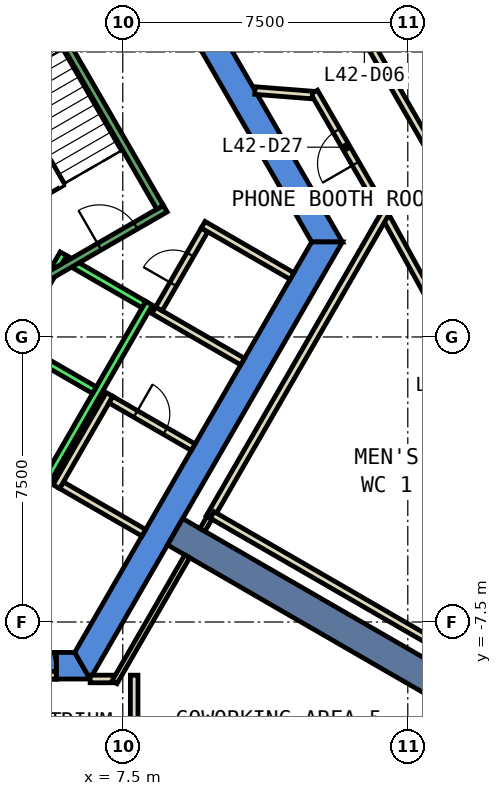
"""IFC4 building model, lengths in metres.
Left out: names, types, materials, properties, quantities, classifications, styles, units other than length and angle.
Written with IfcOpenShell. Run it as: python <this file> out.ifc"""

import sys

from ifc_helpers import new_model, si_unit, direction, frame, frame_2d, origin, place, context, subcontext, project, spatial, polyline, rectangle, outline, extrude, element, fill, save


model = new_model("IFC4")
c1 = context("Model", 3, precision=1e-05, world=origin(), true_north=direction((0.0, 1.0)))
c2 = subcontext(c1, "Body", "Model", "MODEL_VIEW")
j1 = project(units=[si_unit("LENGTHUNIT", "METRE"), si_unit("PLANEANGLEUNIT", "RADIAN")], contexts=[c1])
p1 = place(None, origin())
s1 = spatial("IfcSite", under=j1, at=p1, CompositionType="ELEMENT")
p2 = place(p1, origin())
s2 = spatial("IfcBuilding", under=s1, at=p2, CompositionType="ELEMENT")
p3 = place(p2, frame((0.0, 0.0, 189.8)))
s3 = spatial("IfcBuildingStorey", under=s2, at=p3, CompositionType="ELEMENT", Elevation=189.8)
p4 = place(p3, frame((0.0, 0.0, -0.6)))
e1 = element("IfcWall", 1, at=p4, inside=s3, PredefinedType="SHEAR", context=c2, shape_type="SweptSolid", body=[
    extrude(outline(polyline([(8.084, 11.498), (7.478, 11.148), (12.471, 2.5), (13.279, 2.5), (8.084, 11.498)])), origin(), (0.0, 0.0, 1.0), 4.4),
])
p5 = place(p3, frame((0.0, 0.0, -0.6)))
e2 = element("IfcWall", 2, at=p5, inside=s3, PredefinedType="SHEAR", context=c2, shape_type="SweptSolid", body=[
    extrude(outline(polyline([(5.75, -8.3), (5.75, -9.0), (6.64, -9.0), (6.235, -8.3), (5.75, -8.3)])), origin(), (0.0, 0.0, 1.0), 4.4),
])
p6 = place(p3, frame((0.0, 0.0, 3.6)))
e3 = element("IfcWall", 3, at=p6, inside=s3, PredefinedType="SHEAR", context=c2, shape_type="SweptSolid", body=[
    extrude(outline(polyline([(5.75, -9.0), (5.75, -8.3), (3.75, -8.3), (3.75, -9.0), (5.75, -9.0)])), origin(), (0.0, 0.0, 1.0), 0.2),
])
p7 = place(p3, frame((0.0, 0.0, -0.6)))
e4 = element("IfcWall", 4, at=p7, inside=s3, PredefinedType="SHEAR", context=c2, shape_type="SweptSolid", body=[
    extrude(outline(polyline([(6.64, -9.0), (13.279, 2.5), (12.471, 2.5), (6.235, -8.3), (6.64, -9.0)])), origin(), (0.0, 0.0, 1.0), 4.4),
])
p8 = place(p3, frame((8.877, -5.125, -0.6), z_axis=(0.0, 0.0, 1.0), x_axis=(0.866017533419, -0.500013631625, 0.0)))
e5 = element("IfcWall", 5, at=p8, inside=s3, PredefinedType="SHEAR", context=c2, shape_type="SweptSolid", body=[
    extrude(rectangle(XDim=9.0, YDim=0.8, at=frame_2d((4.5, 0.0))), origin(), (0.0, 0.0, 1.0), 4.4),
])
p9 = place(p3, frame((14.213, 3.543, 0.0), z_axis=(0.0, 0.0, 1.0), x_axis=(-0.500182898346, 0.865919781621, 0.0)))
e6 = element("IfcWall", 6, at=p9, inside=s3, PredefinedType="PARTITIONING", context=c2, shape_type="SweptSolid", body=[
    extrude(rectangle(XDim=3.35, YDim=0.2, at=frame_2d((1.675, 0.0))), origin(), (0.0, 0.0, 1.0), 3.8),
])
p10 = place(p9, frame((1.175, 0.0, 0.0)))
e7 = element("IfcOpeningElement", 7, at=p10, cuts=e6, PredefinedType="OPENING", context=c2, shape_type="SweptSolid", body=[
    extrude(rectangle(XDim=1.0, YDim=2.1, at=frame_2d((0.5, 1.05))), frame((0.0, 0.11, 0.0), z_axis=(0.0, -1.0, 0.0), x_axis=(1.0, 0.0, 0.0)), (0.0, 0.0, 1.0), 0.22),
])
p11 = place(p3, frame((12.488, 6.366, 0.0), z_axis=(0.0, 0.0, 1.0), x_axis=(-0.996960771308, 0.077905201835, 0.0)))
e8 = element("IfcWall", 8, at=p11, inside=s3, PredefinedType="PARTITIONING", context=c2, shape_type="SweptSolid", body=[
    extrude(rectangle(XDim=1.514, YDim=0.2, at=frame_2d((0.757, 0.0))), origin(), (0.0, 0.0, 1.0), 3.8),
])
p12 = place(p3, frame((18.112, -3.531, 0.0), z_axis=(0.0, 0.0, 1.0), x_axis=(-0.482800061144, 0.875730609811, 0.0)))
e9 = element("IfcWall", 9, at=p12, inside=s3, PredefinedType="PARTITIONING", context=c2, shape_type="SweptSolid", body=[
    extrude(rectangle(XDim=7.612, YDim=0.2, at=frame_2d((3.806, 0.0))), origin(), (0.0, 0.0, 1.0), 3.8),
])
p13 = place(p12, frame((3.306, 0.0, 0.0)))
e10 = element("IfcOpeningElement", 10, at=p13, cuts=e9, PredefinedType="OPENING", context=c2, shape_type="SweptSolid", body=[
    extrude(rectangle(XDim=1.0, YDim=2.1, at=frame_2d((0.5, 1.05))), frame((0.0, 0.11, 0.0), z_axis=(0.0, -1.0, 0.0), x_axis=(1.0, 0.0, 0.0)), (0.0, 0.0, 1.0), 0.22),
])
p14 = place(p3, frame((11.811, 11.503, 0.0), z_axis=(0.0, 0.0, 1.0), x_axis=(0.500013420409, -0.866017655369, 0.0)))
e11 = element("IfcWall", 11, at=p14, inside=s3, PredefinedType="PARTITIONING", context=c2, shape_type="SweptSolid", body=[
    extrude(rectangle(XDim=8.038, YDim=0.2, at=frame_2d((4.019, 0.0))), origin(), (0.0, 0.0, 1.0), 3.8),
])
p15 = place(p14, frame((3.594, 0.0, 0.0)))
e12 = element("IfcOpeningElement", 12, at=p15, cuts=e11, PredefinedType="OPENING", context=c2, shape_type="SweptSolid", body=[
    extrude(rectangle(XDim=1.0, YDim=2.1, at=frame_2d((0.5, 1.05))), frame((0.0, 0.11, 0.0), z_axis=(0.0, -1.0, 0.0), x_axis=(1.0, 0.0, 0.0)), (0.0, 0.0, 1.0), 0.22),
])
p16 = place(p3, frame((8.053, -5.152, 0.0), z_axis=(0.0, 0.0, 1.0), x_axis=(-0.866022959057, 0.500004234368, 0.0)))
e13 = element("IfcWall", 13, at=p16, inside=s3, PredefinedType="PARTITIONING", context=c2, shape_type="SweptSolid", body=[
    extrude(rectangle(XDim=2.5, YDim=0.2, at=frame_2d((1.25, 0.0))), origin(), (0.0, 0.0, 1.0), 3.8),
])
p17 = place(p3, frame((5.751, -3.938, 0.0), z_axis=(0.0, 0.0, 1.0), x_axis=(0.49994636267, 0.866056369097, 0.0)))
e14 = element("IfcWall", 14, at=p17, inside=s3, PredefinedType="PARTITIONING", context=c2, shape_type="SweptSolid", body=[
    extrude(rectangle(XDim=2.8, YDim=0.2, at=frame_2d((1.4, 0.0))), origin(), (0.0, 0.0, 1.0), 3.8),
])
p18 = place(p3, frame((7.188, -1.65, 0.0), z_axis=(0.0, 0.0, 1.0), x_axis=(0.866022959057, -0.500004234368, 0.0)))
e15 = element("IfcWall", 15, at=p18, inside=s3, PredefinedType="PARTITIONING", context=c2, shape_type="SweptSolid", body=[
    extrude(rectangle(XDim=2.5, YDim=0.2, at=frame_2d((1.25, 0.0))), origin(), (0.0, 0.0, 1.0), 3.8),
])
p19 = place(p18, frame((0.75, 0.0, 0.0)))
e16 = element("IfcOpeningElement", 16, at=p19, cuts=e15, PredefinedType="OPENING", context=c2, shape_type="SweptSolid", body=[
    extrude(rectangle(XDim=0.9, YDim=2.1, at=frame_2d((0.45, 1.05))), frame((0.0, 0.11, 0.0), z_axis=(0.0, -1.0, 0.0), x_axis=(1.0, 0.0, 0.0)), (0.0, 0.0, 1.0), 0.22),
])
p20 = place(p3, frame((10.653, -0.648, 0.0), z_axis=(0.0, 0.0, 1.0), x_axis=(-0.866036505625, 0.499980770555, 0.0)))
e17 = element("IfcWall", 17, at=p20, inside=s3, PredefinedType="PARTITIONING", context=c2, shape_type="SweptSolid", body=[
    extrude(rectangle(XDim=2.7, YDim=0.2, at=frame_2d((1.35, 0.0))), origin(), (0.0, 0.0, 1.0), 3.8),
])
p21 = place(p3, frame((8.451, 0.738, 0.0), z_axis=(0.0, 0.0, 1.0), x_axis=(0.499913221443, 0.866075499611, 0.0)))
e18 = element("IfcWall", 18, at=p21, inside=s3, PredefinedType="PARTITIONING", context=c2, shape_type="SweptSolid", body=[
    extrude(rectangle(XDim=2.4, YDim=0.2, at=frame_2d((1.2, 0.0))), origin(), (0.0, 0.0, 1.0), 3.8),
])
p22 = place(p21, frame((0.75, 0.0, 0.0)))
e19 = element("IfcOpeningElement", 19, at=p22, cuts=e18, PredefinedType="OPENING", context=c2, shape_type="SweptSolid", body=[
    extrude(rectangle(XDim=0.9, YDim=2.1, at=frame_2d((0.45, 1.05))), frame((0.0, 0.11, 0.0), z_axis=(0.0, -1.0, 0.0), x_axis=(1.0, 0.0, 0.0)), (0.0, 0.0, 1.0), 0.22),
])
p23 = place(p3, frame((9.615, 2.953, 0.0), z_axis=(0.0, 0.0, 1.0), x_axis=(0.866013897511, -0.50001992892, 0.0)))
e20 = element("IfcWall", 20, at=p23, inside=s3, PredefinedType="PARTITIONING", context=c2, shape_type="SweptSolid", body=[
    extrude(rectangle(XDim=2.7, YDim=0.2, at=frame_2d((1.35, 0.0))), origin(), (0.0, 0.0, 1.0), 3.8),
])
p24 = place(p3, frame((6.641, -8.999, 0.0), z_axis=(0.0, 0.0, 1.0), x_axis=(1.0, 0.0, 0.0)))
e21 = element("IfcWall", 21, at=p24, inside=s3, PredefinedType="PARTITIONING", context=c2, shape_type="SweptSolid", body=[
    extrude(rectangle(XDim=0.617, YDim=0.2, at=frame_2d((0.309, 0.0))), origin(), (0.0, 0.0, 1.0), 3.8),
])
p25 = place(p3, frame((7.283, -9.086, 0.0), z_axis=(0.0, 0.0, 1.0), x_axis=(0.499843936326, 0.866115488442, 0.0)))
e22 = element("IfcWall", 22, at=p25, inside=s3, PredefinedType="PARTITIONING", context=c2, shape_type="SweptSolid", body=[
    extrude(rectangle(XDim=3.827, YDim=0.15, at=frame_2d((1.914, 0.0))), origin(), (0.0, 0.0, 1.0), 3.8),
])
p26 = place(p3, frame((9.781, -4.758, 0.0), z_axis=(0.0, 0.0, 1.0), x_axis=(0.50003174578, 0.866007074574, 0.0)))
e23 = element("IfcWall", 23, at=p26, inside=s3, PredefinedType="PARTITIONING", context=c2, shape_type="SweptSolid", body=[
    extrude(rectangle(XDim=9.315, YDim=0.2, at=frame_2d((4.658, 0.0))), origin(), (0.0, 0.0, 1.0), 3.8),
])
p27 = place(p3, frame((7.8, -8.899, 0.0), z_axis=(0.0, 0.0, 1.0), x_axis=(0.0, -1.0, 0.0)))
e24 = element("IfcWall", 24, at=p27, inside=s3, PredefinedType="PARTITIONING", context=c2, shape_type="SweptSolid", body=[
    extrude(rectangle(XDim=5.025, YDim=0.2, at=frame_2d((2.513, 0.0))), origin(), (0.0, 0.0, 1.0), 3.8),
])
p28 = place(p3, frame((9.853, -4.684, 0.0), z_axis=(0.0, 0.0, 1.0), x_axis=(0.865999791918, -0.500044358431, 0.0)))
e25 = element("IfcWall", 25, at=p28, inside=s3, PredefinedType="PARTITIONING", context=c2, shape_type="SweptSolid", body=[
    extrude(rectangle(XDim=8.075, YDim=0.2, at=frame_2d((4.038, 0.0))), origin(), (0.0, 0.0, 1.0), 3.8),
])
p29 = place(p3, frame((16.125, -9.771, 0.0), z_axis=(0.0, 0.0, 1.0), x_axis=(-0.500030759312, -0.866007644159, 0.0)))
e26 = element("IfcWall", 26, at=p29, inside=s3, PredefinedType="PARTITIONING", context=c2, shape_type="SweptSolid", body=[
    extrude(rectangle(XDim=4.73, YDim=0.2, at=frame_2d((2.365, 0.0))), origin(), (0.0, 0.0, 1.0), 3.8),
])
p30 = place(p3, frame((3.75, -8.9, 0.0), z_axis=(0.0, 0.0, 1.0), x_axis=(1.0, 0.0, 0.0)))
e27 = element("IfcWall", 27, at=p30, inside=s3, PredefinedType="PARTITIONING", context=c2, shape_type="SweptSolid", body=[
    extrude(rectangle(XDim=2.0, YDim=0.2, at=frame_2d((1.0, 0.0))), origin(), (0.0, 0.0, 1.0), 2.4),
])
p31 = place(p30, frame((0.19, 0.0, 0.0)))
e28 = element("IfcOpeningElement", 28, at=p31, cuts=e27, PredefinedType="OPENING", context=c2, shape_type="SweptSolid", body=[
    extrude(rectangle(XDim=1.8, YDim=2.1, at=frame_2d((0.9, 1.05))), frame((0.0, 0.11, 0.0), z_axis=(0.0, -1.0, 0.0), x_axis=(1.0, 0.0, 0.0)), (0.0, 0.0, 1.0), 0.22),
])
p32 = place(p3, frame((9.596, -5.078, 0.0), z_axis=(0.0, 0.0, 1.0), x_axis=(0.500827895298, 0.86554689029, 0.0)))
e29 = element("IfcWall", 29, at=p32, inside=s3, PredefinedType="PARTITIONING", context=c2, shape_type="SweptSolid", body=[
    extrude(rectangle(XDim=0.369, YDim=0.15, at=frame_2d((0.185, 0.0))), origin(), (0.0, 0.0, 1.0), 3.8),
])
p33 = place(p3, frame((3.24, -2.488, 0.0), z_axis=(0.0, 0.0, 1.0), x_axis=(0.500034260056, 0.866005622828, 0.0)))
e30 = element("IfcWall", 30, at=p33, inside=s3, PredefinedType="STANDARD", context=c2, shape_type="SweptSolid", body=[
    extrude(rectangle(XDim=5.399, YDim=0.2, at=frame_2d((2.7, 0.0))), origin(), (0.0, 0.0, 1.0), 3.8),
])
p34 = place(p33, frame((3.225, 0.0, 0.0)))
e31 = element("IfcOpeningElement", 31, at=p34, cuts=e30, PredefinedType="OPENING", context=c2, shape_type="SweptSolid", body=[
    extrude(rectangle(XDim=1.1, YDim=2.1, at=frame_2d((0.55, 1.05))), frame((0.0, 0.11, 0.0), z_axis=(0.0, -1.0, 0.0), x_axis=(1.0, 0.0, 0.0)), (0.0, 0.0, 1.0), 0.22),
])
p35 = place(p33, frame((1.225, 0.0, 0.0)))
e32 = element("IfcOpeningElement", 32, at=p35, cuts=e30, PredefinedType="OPENING", context=c2, shape_type="SweptSolid", body=[
    extrude(rectangle(XDim=1.1, YDim=2.1, at=frame_2d((0.55, 1.05))), frame((0.0, 0.11, 0.0), z_axis=(0.0, -1.0, 0.0), x_axis=(1.0, 0.0, 0.0)), (0.0, 0.0, 1.0), 0.22),
])
p36 = place(p3, frame((5.492, -3.788, 0.0), z_axis=(0.0, 0.0, 1.0), x_axis=(0.500034260056, 0.866005622828, 0.0)))
e33 = element("IfcWall", 33, at=p36, inside=s3, PredefinedType="STANDARD", context=c2, shape_type="SweptSolid", body=[
    extrude(rectangle(XDim=5.399, YDim=0.2, at=frame_2d((2.7, 0.0))), origin(), (0.0, 0.0, 1.0), 3.8),
])
for number, where, z_axis, x_axis in (
    (34, (4.677, -0.2, 0.0), (0.0, 0.0, 1.0), (0.866, -0.5, 0.0)),
    (35, (5.977, 2.052, 0.0), (0.0, 0.0, 1.0), (0.866, -0.5, 0.0)),
):
    element("IfcWall", number, at=place(p3, frame(where, z_axis=z_axis, x_axis=x_axis)), inside=s3, PredefinedType="STANDARD", context=c2, shape_type="SweptSolid", body=[
        extrude(rectangle(XDim=2.399, YDim=0.2, at=frame_2d((1.2, 0.0))), origin(), (0.0, 0.0, 1.0), 3.8),
    ])
p37 = place(p3, frame((4.806, 1.176, 0.0), z_axis=(0.0, 0.0, 1.0), x_axis=(0.866059941101, 0.499940174841, 0.0)))
e36 = element("IfcWall", 36, at=p37, inside=s3, PredefinedType="STANDARD", context=c2, shape_type="SweptSolid", body=[
    extrude(rectangle(XDim=4.4, YDim=0.2, at=frame_2d((2.2, 0.0))), origin(), (0.0, 0.0, 1.0), 3.8),
])
p38 = place(p37, frame((2.4, 0.0, 0.0)))
e37 = element("IfcOpeningElement", 37, at=p38, cuts=e36, PredefinedType="OPENING", context=c2, shape_type="SweptSolid", body=[
    extrude(rectangle(XDim=1.1, YDim=2.2, at=frame_2d((0.55, 1.1))), frame((0.0, 0.11, 0.0), z_axis=(0.0, -1.0, 0.0), x_axis=(1.0, 0.0, 0.0)), (0.0, 0.0, 1.0), 0.22),
])
p39 = place(p3, frame((8.48, 3.412, 0.0), z_axis=(0.0, 0.0, 1.0), x_axis=(-0.499978703459, 0.866037698999, 0.0)))
e38 = element("IfcWall", 38, at=p39, inside=s3, PredefinedType="STANDARD", context=c2, shape_type="SweptSolid", body=[
    extrude(rectangle(XDim=6.9, YDim=0.2, at=frame_2d((3.45, 0.0))), origin(), (0.0, 0.0, 1.0), 3.8),
])
p40 = place(p10, origin())
e39 = element("IfcDoor", 39, at=p40, inside=s3, OperationType="SINGLE_SWING_LEFT", PredefinedType="DOOR", context=c2, shape_type="SweptSolid", body=[
    extrude(rectangle(XDim=1.0, YDim=2.1, at=frame_2d((0.5, 1.05))), frame((0.0, 0.025, 0.0), z_axis=(0.0, -1.0, 0.0), x_axis=(1.0, 0.0, 0.0)), (0.0, 0.0, 1.0), 0.05),
])
fill(e7, e39)
p41 = place(p19, origin())
e40 = element("IfcDoor", 40, at=p41, inside=s3, OperationType="SINGLE_SWING_RIGHT", PredefinedType="DOOR", context=c2, shape_type="SweptSolid", body=[
    extrude(rectangle(XDim=0.9, YDim=2.1, at=frame_2d((0.45, 1.05))), frame((0.0, 0.025, 0.0), z_axis=(0.0, -1.0, 0.0), x_axis=(1.0, 0.0, 0.0)), (0.0, 0.0, 1.0), 0.05),
])
fill(e16, e40)
p42 = place(p22, origin())
e41 = element("IfcDoor", 41, at=p42, inside=s3, OperationType="SINGLE_SWING_LEFT", PredefinedType="DOOR", context=c2, shape_type="SweptSolid", body=[
    extrude(rectangle(XDim=0.9, YDim=2.1, at=frame_2d((0.45, 1.05))), frame((0.0, 0.025, 0.0), z_axis=(0.0, -1.0, 0.0), x_axis=(1.0, 0.0, 0.0)), (0.0, 0.0, 1.0), 0.05),
])
fill(e19, e41)
p43 = place(p31, origin())
e42 = element("IfcDoor", 42, at=p43, inside=s3, OperationType="DOUBLE_DOOR_SINGLE_SWING", PredefinedType="DOOR", context=c2, shape_type="SweptSolid", body=[
    extrude(rectangle(XDim=1.8, YDim=2.1, at=frame_2d((0.9, 1.05))), frame((0.0, 0.025, 0.0), z_axis=(0.0, -1.0, 0.0), x_axis=(1.0, 0.0, 0.0)), (0.0, 0.0, 1.0), 0.05),
])
fill(e28, e42)
p44 = place(p38, origin())
e43 = element("IfcDoor", 43, at=p44, inside=s3, OperationType="SINGLE_SWING_LEFT", PredefinedType="DOOR", context=c2, shape_type="SweptSolid", body=[
    extrude(rectangle(XDim=1.1, YDim=2.2, at=frame_2d((0.55, 1.1))), frame((0.0, 0.025, 0.0), z_axis=(0.0, -1.0, 0.0), x_axis=(1.0, 0.0, 0.0)), (0.0, 0.0, 1.0), 0.05),
])
fill(e37, e43)
save(model, sys.argv[1])
